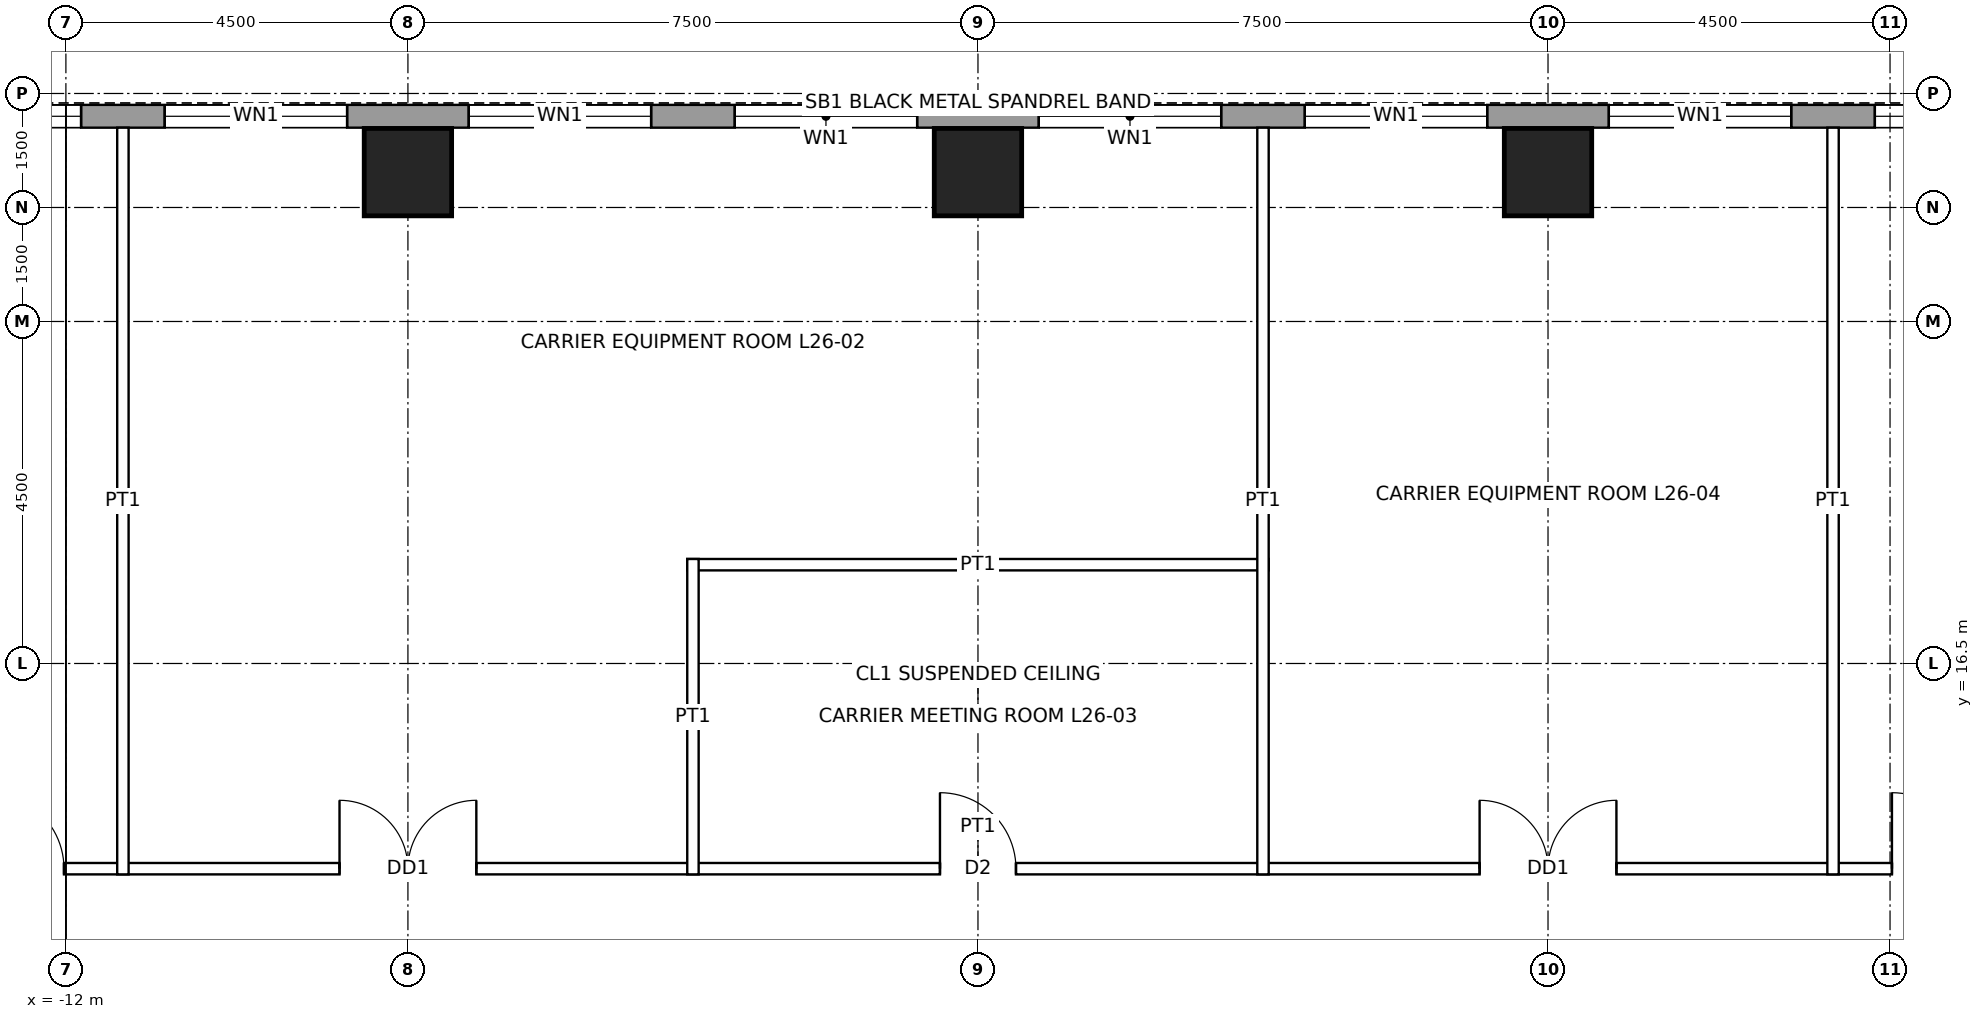
"""IFC4 building model, lengths in metres.
Left out: names, types, materials, properties, quantities, classifications, styles, units other than length and angle.
Written with IfcOpenShell. Run it as: python <this file> out.ifc"""

import sys

from ifc_helpers import new_model, si_unit, direction, frame, frame_2d, origin, origin_2d, place, context, subcontext, project, spatial, rectangle, hollow_rectangle, extrude, element, fill, save


model = new_model("IFC4")
c1 = context("Model", 3, precision=1e-05, world=origin(), true_north=direction((0.0, 1.0)))
c2 = subcontext(c1, "Body", "Model", "MODEL_VIEW")
j1 = project(units=[si_unit("LENGTHUNIT", "METRE"), si_unit("PLANEANGLEUNIT", "RADIAN")], contexts=[c1])
p1 = place(None, origin())
s1 = spatial("IfcSite", under=j1, at=p1, CompositionType="ELEMENT")
p2 = place(p1, origin())
s2 = spatial("IfcBuilding", under=s1, at=p2, CompositionType="ELEMENT")
p3 = place(p2, frame((0.0, 0.0, 131.4)))
s3 = spatial("IfcBuildingStorey", under=s2, at=p3, CompositionType="ELEMENT", Elevation=131.4)
for number, where, z_axis, x_axis in (
    (1, (-7.5, 22.965, 0.0), (0.0, 0.0, 1.0), (1.0, 0.0, 0.0)),
    (2, (0.0, 22.965, 0.0), (0.0, 0.0, 1.0), (1.0, 0.0, 0.0)),
    (3, (7.5, 22.965, 0.0), (0.0, 0.0, 1.0), (1.0, 0.0, 0.0)),
):
    element("IfcColumn", number, at=place(p3, frame(where, z_axis=z_axis, x_axis=x_axis)), inside=s3, PredefinedType="COLUMN", context=c2, shape_type="SweptSolid", body=[
        extrude(hollow_rectangle(XDim=1.15, YDim=1.15, WallThickness=0.075, at=origin_2d()), origin(), (0.0, 0.0, 1.0), 4.5),
    ])
p4 = place(p3, frame((-16.2, 23.7, 0.0), z_axis=(0.0, 0.0, 1.0), x_axis=(1.0, 0.0, 0.0)))
e4 = element("IfcWall", 4, at=p4, inside=s3, PredefinedType="SOLIDWALL", context=c2, shape_type="SweptSolid", body=[
    extrude(rectangle(XDim=32.4, YDim=0.3, at=frame_2d((16.2, 0.0))), origin(), (0.0, 0.0, 1.0), 4.3),
])
p5 = place(p4, frame((2.0, 0.0, 1.0)))
e5 = element("IfcOpeningElement", 5, at=p5, cuts=e4, PredefinedType="OPENING", context=c2, shape_type="SweptSolid", body=[
    extrude(rectangle(XDim=2.4, YDim=1.2, at=frame_2d((1.2, 0.6))), frame((0.0, 0.16, 0.0), z_axis=(0.0, -1.0, 0.0), x_axis=(1.0, 0.0, 0.0)), (0.0, 0.0, 1.0), 0.32),
])
p6 = place(p4, frame((5.5, 0.0, 1.0)))
e6 = element("IfcOpeningElement", 6, at=p6, cuts=e4, PredefinedType="OPENING", context=c2, shape_type="SweptSolid", body=[
    extrude(rectangle(XDim=2.4, YDim=1.2, at=frame_2d((1.2, 0.6))), frame((0.0, 0.16, 0.0), z_axis=(0.0, -1.0, 0.0), x_axis=(1.0, 0.0, 0.0)), (0.0, 0.0, 1.0), 0.32),
])
p7 = place(p4, frame((9.5, 0.0, 1.0)))
e7 = element("IfcOpeningElement", 7, at=p7, cuts=e4, PredefinedType="OPENING", context=c2, shape_type="SweptSolid", body=[
    extrude(rectangle(XDim=2.4, YDim=1.2, at=frame_2d((1.2, 0.6))), frame((0.0, 0.16, 0.0), z_axis=(0.0, -1.0, 0.0), x_axis=(1.0, 0.0, 0.0)), (0.0, 0.0, 1.0), 0.32),
])
p8 = place(p4, frame((13.0, 0.0, 1.0)))
e8 = element("IfcOpeningElement", 8, at=p8, cuts=e4, PredefinedType="OPENING", context=c2, shape_type="SweptSolid", body=[
    extrude(rectangle(XDim=2.4, YDim=1.2, at=frame_2d((1.2, 0.6))), frame((0.0, 0.16, 0.0), z_axis=(0.0, -1.0, 0.0), x_axis=(1.0, 0.0, 0.0)), (0.0, 0.0, 1.0), 0.32),
])
p9 = place(p4, frame((17.0, 0.0, 1.0)))
e9 = element("IfcOpeningElement", 9, at=p9, cuts=e4, PredefinedType="OPENING", context=c2, shape_type="SweptSolid", body=[
    extrude(rectangle(XDim=2.4, YDim=1.2, at=frame_2d((1.2, 0.6))), frame((0.0, 0.16, 0.0), z_axis=(0.0, -1.0, 0.0), x_axis=(1.0, 0.0, 0.0)), (0.0, 0.0, 1.0), 0.32),
])
p10 = place(p4, frame((20.5, 0.0, 1.0)))
e10 = element("IfcOpeningElement", 10, at=p10, cuts=e4, PredefinedType="OPENING", context=c2, shape_type="SweptSolid", body=[
    extrude(rectangle(XDim=2.4, YDim=1.2, at=frame_2d((1.2, 0.6))), frame((0.0, 0.16, 0.0), z_axis=(0.0, -1.0, 0.0), x_axis=(1.0, 0.0, 0.0)), (0.0, 0.0, 1.0), 0.32),
])
p11 = place(p4, frame((24.5, 0.0, 1.0)))
e11 = element("IfcOpeningElement", 11, at=p11, cuts=e4, PredefinedType="OPENING", context=c2, shape_type="SweptSolid", body=[
    extrude(rectangle(XDim=2.4, YDim=1.2, at=frame_2d((1.2, 0.6))), frame((0.0, 0.16, 0.0), z_axis=(0.0, -1.0, 0.0), x_axis=(1.0, 0.0, 0.0)), (0.0, 0.0, 1.0), 0.32),
])
p12 = place(p4, frame((28.0, 0.0, 1.0)))
e12 = element("IfcOpeningElement", 12, at=p12, cuts=e4, PredefinedType="OPENING", context=c2, shape_type="SweptSolid", body=[
    extrude(rectangle(XDim=2.4, YDim=1.2, at=frame_2d((1.2, 0.6))), frame((0.0, 0.16, 0.0), z_axis=(0.0, -1.0, 0.0), x_axis=(1.0, 0.0, 0.0)), (0.0, 0.0, 1.0), 0.32),
])
p13 = place(p3, frame((-13.875, 13.8, 0.0), z_axis=(0.0, 0.0, 1.0), x_axis=(1.0, 0.0, 0.0)))
e13 = element("IfcWall", 13, at=p13, inside=s3, PredefinedType="PARTITIONING", context=c2, shape_type="SweptSolid", body=[
    extrude(rectangle(XDim=27.75, YDim=0.15, at=frame_2d((13.875, 0.0))), origin(), (0.0, 0.0, 1.0), 4.3),
])
p14 = place(p13, frame((5.475, 0.0, 0.0)))
e14 = element("IfcOpeningElement", 14, at=p14, cuts=e13, PredefinedType="OPENING", context=c2, shape_type="SweptSolid", body=[
    extrude(rectangle(XDim=1.8, YDim=2.4, at=frame_2d((0.9, 1.2))), frame((0.0, 0.085, 0.0), z_axis=(0.0, -1.0, 0.0), x_axis=(1.0, 0.0, 0.0)), (0.0, 0.0, 1.0), 0.17),
])
p15 = place(p13, frame((13.375, 0.0, 0.0)))
e15 = element("IfcOpeningElement", 15, at=p15, cuts=e13, PredefinedType="OPENING", context=c2, shape_type="SweptSolid", body=[
    extrude(rectangle(XDim=1.0, YDim=2.1, at=frame_2d((0.5, 1.05))), frame((0.0, 0.085, 0.0), z_axis=(0.0, -1.0, 0.0), x_axis=(1.0, 0.0, 0.0)), (0.0, 0.0, 1.0), 0.17),
])
p16 = place(p13, frame((20.475, 0.0, 0.0)))
e16 = element("IfcOpeningElement", 16, at=p16, cuts=e13, PredefinedType="OPENING", context=c2, shape_type="SweptSolid", body=[
    extrude(rectangle(XDim=1.8, YDim=2.4, at=frame_2d((0.9, 1.2))), frame((0.0, 0.085, 0.0), z_axis=(0.0, -1.0, 0.0), x_axis=(1.0, 0.0, 0.0)), (0.0, 0.0, 1.0), 0.17),
])
p17 = place(p13, frame((25.9, 0.0, 0.0)))
e17 = element("IfcOpeningElement", 17, at=p17, cuts=e13, PredefinedType="OPENING", context=c2, shape_type="SweptSolid", body=[
    extrude(rectangle(XDim=1.0, YDim=2.1, at=frame_2d((0.5, 1.05))), frame((0.0, 0.085, 0.0), z_axis=(0.0, -1.0, 0.0), x_axis=(1.0, 0.0, 0.0)), (0.0, 0.0, 1.0), 0.17),
])
p18 = place(p13, frame((0.85, 0.0, 0.0)))
e18 = element("IfcOpeningElement", 18, at=p18, cuts=e13, PredefinedType="OPENING", context=c2, shape_type="SweptSolid", body=[
    extrude(rectangle(XDim=1.0, YDim=2.1, at=frame_2d((0.5, 1.05))), frame((0.0, 0.085, 0.0), z_axis=(0.0, -1.0, 0.0), x_axis=(1.0, 0.0, 0.0)), (0.0, 0.0, 1.0), 0.17),
])
p19 = place(p3, frame((-3.825, 17.8, 0.0), z_axis=(0.0, 0.0, 1.0), x_axis=(1.0, 0.0, 0.0)))
e19 = element("IfcWall", 19, at=p19, inside=s3, PredefinedType="PARTITIONING", context=c2, shape_type="SweptSolid", body=[
    extrude(rectangle(XDim=7.65, YDim=0.15, at=frame_2d((3.825, 0.0))), origin(), (0.0, 0.0, 1.0), 4.3),
])
p20 = place(p3, frame((-11.25, 13.725, 0.0), z_axis=(0.0, 0.0, 1.0), x_axis=(0.0, 1.0, 0.0)))
e20 = element("IfcWall", 20, at=p20, inside=s3, PredefinedType="PARTITIONING", context=c2, shape_type="SweptSolid", body=[
    extrude(rectangle(XDim=9.825, YDim=0.15, at=frame_2d((4.913, 0.0))), origin(), (0.0, 0.0, 1.0), 3.431),
])
p21 = place(p3, frame((-3.75, 13.725, 0.0), z_axis=(0.0, 0.0, 1.0), x_axis=(0.0, 1.0, 0.0)))
e21 = element("IfcWall", 21, at=p21, inside=s3, PredefinedType="PARTITIONING", context=c2, shape_type="SweptSolid", body=[
    extrude(rectangle(XDim=4.15, YDim=0.15, at=frame_2d((2.075, 0.0))), origin(), (0.0, 0.0, 1.0), 3.431),
])
for number, where, z_axis, x_axis in (
    (22, (3.75, 13.725, 0.0), (0.0, 0.0, 1.0), (0.0, 1.0, 0.0)),
    (23, (11.25, 13.725, 0.0), (0.0, 0.0, 1.0), (0.0, 1.0, 0.0)),
):
    element("IfcWall", number, at=place(p3, frame(where, z_axis=z_axis, x_axis=x_axis)), inside=s3, PredefinedType="PARTITIONING", context=c2, shape_type="SweptSolid", body=[
        extrude(rectangle(XDim=9.825, YDim=0.15, at=frame_2d((4.913, 0.0))), origin(), (0.0, 0.0, 1.0), 3.431),
    ])
p22 = place(p5, origin())
e24 = element("IfcWindow", 24, at=p22, inside=s3, PartitioningType="SINGLE_PANEL", PredefinedType="WINDOW", context=c2, shape_type="SweptSolid", body=[
    extrude(rectangle(XDim=2.4, YDim=1.2, at=frame_2d((1.2, 0.6))), frame((0.0, 0.03, 0.0), z_axis=(0.0, -1.0, 0.0), x_axis=(1.0, 0.0, 0.0)), (0.0, 0.0, 1.0), 0.06),
])
fill(e5, e24)
p23 = place(p6, origin())
e25 = element("IfcWindow", 25, at=p23, inside=s3, PartitioningType="SINGLE_PANEL", PredefinedType="WINDOW", context=c2, shape_type="SweptSolid", body=[
    extrude(rectangle(XDim=2.4, YDim=1.2, at=frame_2d((1.2, 0.6))), frame((0.0, 0.03, 0.0), z_axis=(0.0, -1.0, 0.0), x_axis=(1.0, 0.0, 0.0)), (0.0, 0.0, 1.0), 0.06),
])
fill(e6, e25)
p24 = place(p7, origin())
e26 = element("IfcWindow", 26, at=p24, inside=s3, PartitioningType="SINGLE_PANEL", PredefinedType="WINDOW", context=c2, shape_type="SweptSolid", body=[
    extrude(rectangle(XDim=2.4, YDim=1.2, at=frame_2d((1.2, 0.6))), frame((0.0, 0.03, 0.0), z_axis=(0.0, -1.0, 0.0), x_axis=(1.0, 0.0, 0.0)), (0.0, 0.0, 1.0), 0.06),
])
fill(e7, e26)
p25 = place(p8, origin())
e27 = element("IfcWindow", 27, at=p25, inside=s3, PartitioningType="SINGLE_PANEL", PredefinedType="WINDOW", context=c2, shape_type="SweptSolid", body=[
    extrude(rectangle(XDim=2.4, YDim=1.2, at=frame_2d((1.2, 0.6))), frame((0.0, 0.03, 0.0), z_axis=(0.0, -1.0, 0.0), x_axis=(1.0, 0.0, 0.0)), (0.0, 0.0, 1.0), 0.06),
])
fill(e8, e27)
p26 = place(p9, origin())
e28 = element("IfcWindow", 28, at=p26, inside=s3, PartitioningType="SINGLE_PANEL", PredefinedType="WINDOW", context=c2, shape_type="SweptSolid", body=[
    extrude(rectangle(XDim=2.4, YDim=1.2, at=frame_2d((1.2, 0.6))), frame((0.0, 0.03, 0.0), z_axis=(0.0, -1.0, 0.0), x_axis=(1.0, 0.0, 0.0)), (0.0, 0.0, 1.0), 0.06),
])
fill(e9, e28)
p27 = place(p10, origin())
e29 = element("IfcWindow", 29, at=p27, inside=s3, PartitioningType="SINGLE_PANEL", PredefinedType="WINDOW", context=c2, shape_type="SweptSolid", body=[
    extrude(rectangle(XDim=2.4, YDim=1.2, at=frame_2d((1.2, 0.6))), frame((0.0, 0.03, 0.0), z_axis=(0.0, -1.0, 0.0), x_axis=(1.0, 0.0, 0.0)), (0.0, 0.0, 1.0), 0.06),
])
fill(e10, e29)
p28 = place(p11, origin())
e30 = element("IfcWindow", 30, at=p28, inside=s3, PartitioningType="SINGLE_PANEL", PredefinedType="WINDOW", context=c2, shape_type="SweptSolid", body=[
    extrude(rectangle(XDim=2.4, YDim=1.2, at=frame_2d((1.2, 0.6))), frame((0.0, 0.03, 0.0), z_axis=(0.0, -1.0, 0.0), x_axis=(1.0, 0.0, 0.0)), (0.0, 0.0, 1.0), 0.06),
])
fill(e11, e30)
p29 = place(p12, origin())
e31 = element("IfcWindow", 31, at=p29, inside=s3, PartitioningType="SINGLE_PANEL", PredefinedType="WINDOW", context=c2, shape_type="SweptSolid", body=[
    extrude(rectangle(XDim=2.4, YDim=1.2, at=frame_2d((1.2, 0.6))), frame((0.0, 0.03, 0.0), z_axis=(0.0, -1.0, 0.0), x_axis=(1.0, 0.0, 0.0)), (0.0, 0.0, 1.0), 0.06),
])
fill(e12, e31)
p30 = place(p14, origin())
e32 = element("IfcDoor", 32, at=p30, inside=s3, OperationType="DOUBLE_DOOR_SINGLE_SWING", PredefinedType="DOOR", context=c2, shape_type="SweptSolid", body=[
    extrude(rectangle(XDim=1.8, YDim=2.4, at=frame_2d((0.9, 1.2))), frame((0.0, 0.025, 0.0), z_axis=(0.0, -1.0, 0.0), x_axis=(1.0, 0.0, 0.0)), (0.0, 0.0, 1.0), 0.05),
])
fill(e14, e32)
p31 = place(p15, origin())
e33 = element("IfcDoor", 33, at=p31, inside=s3, OperationType="SINGLE_SWING_LEFT", PredefinedType="DOOR", context=c2, shape_type="SweptSolid", body=[
    extrude(rectangle(XDim=1.0, YDim=2.1, at=frame_2d((0.5, 1.05))), frame((0.0, 0.025, 0.0), z_axis=(0.0, -1.0, 0.0), x_axis=(1.0, 0.0, 0.0)), (0.0, 0.0, 1.0), 0.05),
])
fill(e15, e33)
p32 = place(p16, origin())
e34 = element("IfcDoor", 34, at=p32, inside=s3, OperationType="DOUBLE_DOOR_SINGLE_SWING", PredefinedType="DOOR", context=c2, shape_type="SweptSolid", body=[
    extrude(rectangle(XDim=1.8, YDim=2.4, at=frame_2d((0.9, 1.2))), frame((0.0, 0.025, 0.0), z_axis=(0.0, -1.0, 0.0), x_axis=(1.0, 0.0, 0.0)), (0.0, 0.0, 1.0), 0.05),
])
fill(e16, e34)
p33 = place(p17, origin())
e35 = element("IfcDoor", 35, at=p33, inside=s3, OperationType="SINGLE_SWING_LEFT", PredefinedType="DOOR", context=c2, shape_type="SweptSolid", body=[
    extrude(rectangle(XDim=1.0, YDim=2.1, at=frame_2d((0.5, 1.05))), frame((0.0, 0.025, 0.0), z_axis=(0.0, -1.0, 0.0), x_axis=(1.0, 0.0, 0.0)), (0.0, 0.0, 1.0), 0.05),
])
fill(e17, e35)
p34 = place(p18, origin())
e36 = element("IfcDoor", 36, at=p34, inside=s3, OperationType="SINGLE_SWING_LEFT", PredefinedType="DOOR", context=c2, shape_type="SweptSolid", body=[
    extrude(rectangle(XDim=1.0, YDim=2.1, at=frame_2d((0.5, 1.05))), frame((0.0, 0.025, 0.0), z_axis=(0.0, -1.0, 0.0), x_axis=(1.0, 0.0, 0.0)), (0.0, 0.0, 1.0), 0.05),
])
fill(e18, e36)
save(model, sys.argv[1])
